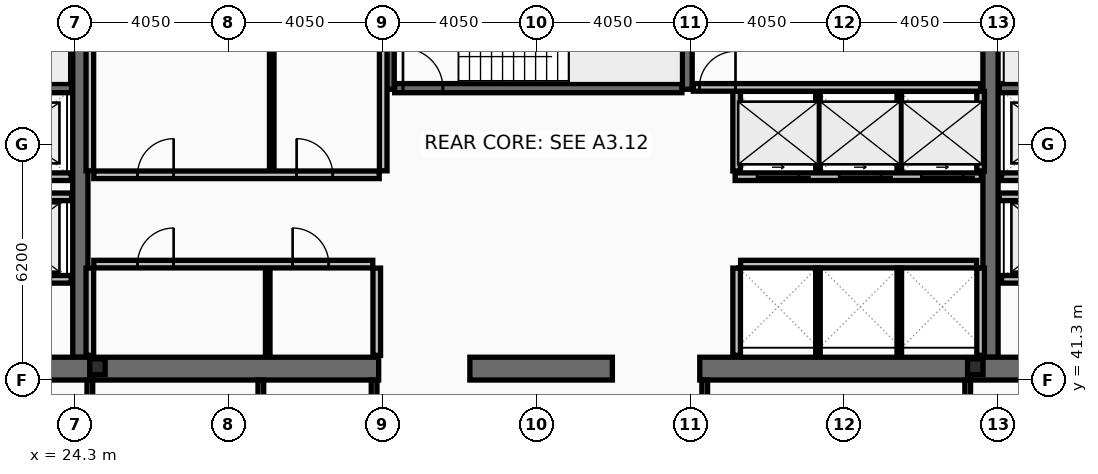
"""IFC4 building model, lengths in metres.
Left out: names, types, materials, properties, quantities, classifications, styles, units other than length and angle.
Written with IfcOpenShell. Run it as: python <this file> out.ifc"""

import sys

from ifc_helpers import new_model, si_unit, direction, frame, frame_2d, origin, origin_2d, place, context, subcontext, project, spatial, rectangle, i_section, extrude, element, fill, save


model = new_model("IFC4")
c1 = context("Model", 3, precision=1e-05, world=origin(), true_north=direction((0.0, 1.0)))
c2 = subcontext(c1, "Body", "Model", "MODEL_VIEW")
j1 = project(units=[si_unit("LENGTHUNIT", "METRE"), si_unit("PLANEANGLEUNIT", "RADIAN")], contexts=[c1])
p1 = place(None, origin())
s1 = spatial("IfcSite", under=j1, at=p1, CompositionType="ELEMENT")
p2 = place(p1, origin())
s2 = spatial("IfcBuilding", under=s1, at=p2, CompositionType="ELEMENT")
p3 = place(p2, frame((0.0, 0.0, 261.8)))
s3 = spatial("IfcBuildingStorey", under=s2, at=p3, CompositionType="ELEMENT", Elevation=261.8)
for number, where, z_axis, x_axis in (
    (1, (24.45, 41.9, 0.0), (0.0, 0.0, 1.0), (0.0, 1.0, 0.0)),
    (2, (48.4, 41.9, 0.0), (0.0, 0.0, 1.0), (0.0, 1.0, 0.0)),
):
    element("IfcWall", number, at=place(p3, frame(where, z_axis=z_axis, x_axis=x_axis)), inside=s3, PredefinedType="SHEAR", context=c2, shape_type="SweptSolid", body=[
        extrude(rectangle(XDim=11.2, YDim=0.4, at=frame_2d((5.6, 0.0))), origin(), (0.0, 0.0, 1.0), 3.4),
    ])
p4 = place(p3, frame((32.3, 41.6, 0.0), z_axis=(0.0, 0.0, 1.0), x_axis=(-1.0, 0.0, 0.0)))
e3 = element("IfcWall", 3, at=p4, inside=s3, PredefinedType="SHEAR", context=c2, shape_type="SweptSolid", body=[
    extrude(rectangle(XDim=11.45, YDim=0.6, at=frame_2d((5.725, 0.0))), origin(), (0.0, 0.0, 1.0), 3.4),
])
p5 = place(p3, frame((38.45, 41.6, 0.0), z_axis=(0.0, 0.0, 1.0), x_axis=(-1.0, 0.0, 0.0)))
e4 = element("IfcWall", 4, at=p5, inside=s3, PredefinedType="SHEAR", context=c2, shape_type="SweptSolid", body=[
    extrude(rectangle(XDim=3.75, YDim=0.6, at=frame_2d((1.875, 0.0))), origin(), (0.0, 0.0, 1.0), 3.4),
])
p6 = place(p3, frame((52.05, 41.6, 0.0), z_axis=(0.0, 0.0, 1.0), x_axis=(-1.0, 0.0, 0.0)))
e5 = element("IfcWall", 5, at=p6, inside=s3, PredefinedType="SHEAR", context=c2, shape_type="SweptSolid", body=[
    extrude(rectangle(XDim=11.3, YDim=0.6, at=frame_2d((5.65, 0.0))), origin(), (0.0, 0.0, 1.0), 3.4),
])
for number, where, z_axis, x_axis in (
    (6, (32.58, 48.95, 0.0), (0.0, 0.0, 1.0), (0.0, 1.0, 0.0)),
    (7, (40.42, 48.95, 0.0), (0.0, 0.0, 1.0), (0.0, 1.0, 0.0)),
):
    element("IfcWall", number, at=place(p3, frame(where, z_axis=z_axis, x_axis=x_axis)), inside=s3, PredefinedType="SHEAR", context=c2, shape_type="SweptSolid", body=[
        extrude(rectangle(XDim=4.15, YDim=0.26, at=frame_2d((2.075, 0.0))), origin(), (0.0, 0.0, 1.0), 3.4),
    ])
p7 = place(p3, frame((16.8, 48.98, 0.0), z_axis=(0.0, 0.0, 1.0), x_axis=(1.0, 0.0, 0.0)))
e8 = element("IfcWall", 8, at=p7, inside=s3, PredefinedType="SHEAR", context=c2, shape_type="SweptSolid", body=[
    extrude(rectangle(XDim=7.42, YDim=0.24, at=frame_2d((3.71, 0.0))), origin(), (0.0, 0.0, 1.0), 3.4),
])
p8 = place(p7, frame((0.22, 0.0, 0.0)))
e9 = element("IfcOpeningElement", 9, at=p8, cuts=e8, PredefinedType="OPENING", context=c2, shape_type="SweptSolid", body=[
    extrude(rectangle(XDim=1.05, YDim=2.15, at=frame_2d((0.525, 1.075))), frame((0.0, 0.13, 0.0), z_axis=(0.0, -1.0, 0.0), x_axis=(1.0, 0.0, 0.0)), (0.0, 0.0, 1.0), 0.26),
])
p9 = place(p3, frame((48.63, 48.98, 0.0), z_axis=(0.0, 0.0, 1.0), x_axis=(1.0, 0.0, 0.0)))
e10 = element("IfcWall", 10, at=p9, inside=s3, PredefinedType="SHEAR", context=c2, shape_type="SweptSolid", body=[
    extrude(rectangle(XDim=7.47, YDim=0.24, at=frame_2d((3.735, 0.0))), origin(), (0.0, 0.0, 1.0), 3.4),
])
p10 = place(p9, frame((6.2, 0.0, 0.0)))
e11 = element("IfcOpeningElement", 11, at=p10, cuts=e10, PredefinedType="OPENING", context=c2, shape_type="SweptSolid", body=[
    extrude(rectangle(XDim=1.05, YDim=2.15, at=frame_2d((0.525, 1.075))), frame((0.0, 0.13, 0.0), z_axis=(0.0, -1.0, 0.0), x_axis=(1.0, 0.0, 0.0)), (0.0, 0.0, 1.0), 0.26),
])
p11 = place(p3, frame((32.72, 48.98, 0.0), z_axis=(0.0, 0.0, 1.0), x_axis=(1.0, 0.0, 0.0)))
e12 = element("IfcWall", 12, at=p11, inside=s3, PredefinedType="SHEAR", context=c2, shape_type="SweptSolid", body=[
    extrude(rectangle(XDim=7.56, YDim=0.24, at=frame_2d((3.78, 0.0))), origin(), (0.0, 0.0, 1.0), 3.4),
])
p12 = place(p11, frame((0.22, 0.0, 0.0)))
e13 = element("IfcOpeningElement", 13, at=p12, cuts=e12, PredefinedType="OPENING", context=c2, shape_type="SweptSolid", body=[
    extrude(rectangle(XDim=1.05, YDim=2.15, at=frame_2d((0.525, 1.075))), frame((0.0, 0.13, 0.0), z_axis=(0.0, -1.0, 0.0), x_axis=(1.0, 0.0, 0.0)), (0.0, 0.0, 1.0), 0.26),
])
for number, where, z_axis, x_axis in (
    (14, (24.9, 41.65, 0.0), (0.0, 0.0, 1.0), (1.0, 0.0, 0.0)),
    (15, (48.0, 41.65, 0.0), (0.0, 0.0, 1.0), (1.0, 0.0, 0.0)),
):
    element("IfcColumn", number, at=place(p3, frame(where, z_axis=z_axis, x_axis=x_axis)), inside=s3, PredefinedType="COLUMN", context=c2, shape_type="SweptSolid", body=[
        extrude(i_section(OverallWidth=0.406, OverallDepth=0.416, WebThickness=0.03, FlangeThickness=0.048, at=origin_2d()), origin(), (0.0, 0.0, 1.0), 3.6),
    ])
p13 = place(p3, frame((51.61, 43.95, 0.0), z_axis=(0.0, 0.0, 1.0), x_axis=(-1.0, 0.0, 0.0)))
e16 = element("IfcWall", 16, at=p13, inside=s3, PredefinedType="PARTITIONING", context=c2, shape_type="SweptSolid", body=[
    extrude(rectangle(XDim=2.92, YDim=0.2, at=frame_2d((1.46, 0.0))), origin(), (0.0, 0.0, 1.0), 3.4),
])
p14 = place(p13, frame((0.81, 0.0, 0.0)))
e17 = element("IfcOpeningElement", 17, at=p14, cuts=e16, PredefinedType="OPENING", context=c2, shape_type="SweptSolid", body=[
    extrude(rectangle(XDim=1.3, YDim=2.18, at=frame_2d((0.65, 1.09))), frame((0.0, 0.11, 0.0), z_axis=(0.0, -1.0, 0.0), x_axis=(1.0, 0.0, 0.0)), (0.0, 0.0, 1.0), 0.22),
])
p15 = place(p3, frame((24.21, 43.95, 0.0), z_axis=(0.0, 0.0, 1.0), x_axis=(-1.0, 0.0, 0.0)))
e18 = element("IfcWall", 18, at=p15, inside=s3, PredefinedType="PARTITIONING", context=c2, shape_type="SweptSolid", body=[
    extrude(rectangle(XDim=2.97, YDim=0.2, at=frame_2d((1.485, 0.0))), origin(), (0.0, 0.0, 1.0), 3.4),
])
p16 = place(p15, frame((0.86, 0.0, 0.0)))
e19 = element("IfcOpeningElement", 19, at=p16, cuts=e18, PredefinedType="OPENING", context=c2, shape_type="SweptSolid", body=[
    extrude(rectangle(XDim=1.3, YDim=2.18, at=frame_2d((0.65, 1.09))), frame((0.0, 0.11, 0.0), z_axis=(0.0, -1.0, 0.0), x_axis=(1.0, 0.0, 0.0)), (0.0, 0.0, 1.0), 0.22),
])
p17 = place(p3, frame((51.61, 46.65, 0.0), z_axis=(0.0, 0.0, 1.0), x_axis=(-1.0, 0.0, 0.0)))
e20 = element("IfcWall", 20, at=p17, inside=s3, PredefinedType="PARTITIONING", context=c2, shape_type="SweptSolid", body=[
    extrude(rectangle(XDim=2.92, YDim=0.2, at=frame_2d((1.46, 0.0))), origin(), (0.0, 0.0, 1.0), 3.4),
])
p18 = place(p17, frame((0.86, 0.0, 0.0)))
e21 = element("IfcOpeningElement", 21, at=p18, cuts=e20, PredefinedType="OPENING", context=c2, shape_type="SweptSolid", body=[
    extrude(rectangle(XDim=1.2, YDim=2.18, at=frame_2d((0.6, 1.09))), frame((0.0, 0.11, 0.0), z_axis=(0.0, -1.0, 0.0), x_axis=(1.0, 0.0, 0.0)), (0.0, 0.0, 1.0), 0.22),
])
p19 = place(p3, frame((24.21, 46.65, 0.0), z_axis=(0.0, 0.0, 1.0), x_axis=(-1.0, 0.0, 0.0)))
e22 = element("IfcWall", 22, at=p19, inside=s3, PredefinedType="PARTITIONING", context=c2, shape_type="SweptSolid", body=[
    extrude(rectangle(XDim=2.97, YDim=0.2, at=frame_2d((1.485, 0.0))), origin(), (0.0, 0.0, 1.0), 3.4),
])
p20 = place(p19, frame((0.91, 0.0, 0.0)))
e23 = element("IfcOpeningElement", 23, at=p20, cuts=e22, PredefinedType="OPENING", context=c2, shape_type="SweptSolid", body=[
    extrude(rectangle(XDim=1.2, YDim=2.18, at=frame_2d((0.6, 1.09))), frame((0.0, 0.11, 0.0), z_axis=(0.0, -1.0, 0.0), x_axis=(1.0, 0.0, 0.0)), (0.0, 0.0, 1.0), 0.22),
])
p21 = place(p3, frame((48.16, 46.65, 0.0), z_axis=(0.0, 0.0, 1.0), x_axis=(-1.0, 0.0, 0.0)))
e24 = element("IfcWall", 24, at=p21, inside=s3, PredefinedType="PARTITIONING", context=c2, shape_type="SweptSolid", body=[
    extrude(rectangle(XDim=6.48, YDim=0.2, at=frame_2d((3.24, 0.0))), origin(), (0.0, 0.0, 1.0), 3.4),
])
p22 = place(p21, frame((4.8, 0.0, 0.0)))
e25 = element("IfcOpeningElement", 25, at=p22, cuts=e24, PredefinedType="OPENING", context=c2, shape_type="SweptSolid", body=[
    extrude(rectangle(XDim=1.1, YDim=2.18, at=frame_2d((0.55, 1.09))), frame((0.0, 0.11, 0.0), z_axis=(0.0, -1.0, 0.0), x_axis=(1.0, 0.0, 0.0)), (0.0, 0.0, 1.0), 0.22),
])
p23 = place(p21, frame((2.64, 0.0, 0.0)))
e26 = element("IfcOpeningElement", 26, at=p23, cuts=e24, PredefinedType="OPENING", context=c2, shape_type="SweptSolid", body=[
    extrude(rectangle(XDim=1.1, YDim=2.18, at=frame_2d((0.55, 1.09))), frame((0.0, 0.11, 0.0), z_axis=(0.0, -1.0, 0.0), x_axis=(1.0, 0.0, 0.0)), (0.0, 0.0, 1.0), 0.22),
])
p24 = place(p21, frame((0.48, 0.0, 0.0)))
e27 = element("IfcOpeningElement", 27, at=p24, cuts=e24, PredefinedType="OPENING", context=c2, shape_type="SweptSolid", body=[
    extrude(rectangle(XDim=1.1, YDim=2.18, at=frame_2d((0.55, 1.09))), frame((0.0, 0.11, 0.0), z_axis=(0.0, -1.0, 0.0), x_axis=(1.0, 0.0, 0.0)), (0.0, 0.0, 1.0), 0.22),
])
p25 = place(p3, frame((21.2, 46.12, 0.0), z_axis=(0.0, 0.0, 1.0), x_axis=(1.0, 0.0, 0.0)))
e28 = element("IfcWall", 28, at=p25, inside=s3, PredefinedType="PARTITIONING", context=c2, shape_type="SweptSolid", body=[
    extrude(rectangle(XDim=3.02, YDim=0.2, at=frame_2d((1.51, 0.0))), origin(), (0.0, 0.0, 1.0), 3.4),
])
p26 = place(p3, frame((48.63, 46.12, 0.0), z_axis=(0.0, 0.0, 1.0), x_axis=(1.0, 0.0, 0.0)))
e29 = element("IfcWall", 29, at=p26, inside=s3, PredefinedType="PARTITIONING", context=c2, shape_type="SweptSolid", body=[
    extrude(rectangle(XDim=3.07, YDim=0.2, at=frame_2d((1.535, 0.0))), origin(), (0.0, 0.0, 1.0), 3.4),
])
for number, where, z_axis, x_axis in (
    (30, (24.7, 46.805, 0.0), (0.0, 0.0, 1.0), (0.0, 1.0, 0.0)),
    (31, (32.42, 46.805, 0.0), (0.0, 0.0, 1.0), (0.0, 1.0, 0.0)),
):
    element("IfcWall", number, at=place(p3, frame(where, z_axis=z_axis, x_axis=x_axis)), inside=s3, PredefinedType="PARTITIONING", context=c2, shape_type="SweptSolid", body=[
        extrude(rectangle(XDim=5.99, YDim=0.2, at=frame_2d((2.995, 0.0))), origin(), (0.0, 0.0, 1.0), 3.4),
    ])
p27 = place(p3, frame((29.486, 46.805, 0.0), z_axis=(0.0, 0.0, 1.0), x_axis=(0.0, 1.0, 0.0)))
e32 = element("IfcWall", 32, at=p27, inside=s3, PredefinedType="PARTITIONING", context=c2, shape_type="SweptSolid", body=[
    extrude(rectangle(XDim=5.99, YDim=0.12, at=frame_2d((2.995, 0.0))), origin(), (0.0, 0.0, 1.0), 3.4),
])
p28 = place(p3, frame((24.805, 46.7, 0.0), z_axis=(0.0, 0.0, 1.0), x_axis=(1.0, 0.0, 0.0)))
e33 = element("IfcWall", 33, at=p28, inside=s3, PredefinedType="PARTITIONING", context=c2, shape_type="SweptSolid", body=[
    extrude(rectangle(XDim=7.51, YDim=0.2, at=frame_2d((3.755, 0.0))), origin(), (0.0, 0.0, 1.0), 3.4),
])
p29 = place(p28, frame((1.15, 0.0, 0.0)))
e34 = element("IfcOpeningElement", 34, at=p29, cuts=e33, PredefinedType="OPENING", context=c2, shape_type="SweptSolid", body=[
    extrude(rectangle(XDim=0.95, YDim=2.1, at=frame_2d((0.475, 1.05))), frame((0.0, 0.11, 0.0), z_axis=(0.0, -1.0, 0.0), x_axis=(1.0, 0.0, 0.0)), (0.0, 0.0, 1.0), 0.22),
])
p30 = place(p28, frame((5.336, 0.0, 0.0)))
e35 = element("IfcOpeningElement", 35, at=p30, cuts=e33, PredefinedType="OPENING", context=c2, shape_type="SweptSolid", body=[
    extrude(rectangle(XDim=0.95, YDim=2.1, at=frame_2d((0.475, 1.05))), frame((0.0, 0.11, 0.0), z_axis=(0.0, -1.0, 0.0), x_axis=(1.0, 0.0, 0.0)), (0.0, 0.0, 1.0), 0.22),
])
for number, where, z_axis, x_axis in (
    (36, (24.7, 41.95, 0.0), (0.0, 0.0, 1.0), (0.0, 1.0, 0.0)),
    (37, (32.25, 41.95, 0.0), (0.0, 0.0, 1.0), (0.0, 1.0, 0.0)),
):
    element("IfcWall", number, at=place(p3, frame(where, z_axis=z_axis, x_axis=x_axis)), inside=s3, PredefinedType="PARTITIONING", context=c2, shape_type="SweptSolid", body=[
        extrude(rectangle(XDim=2.295, YDim=0.2, at=frame_2d((1.147, 0.0))), origin(), (0.0, 0.0, 1.0), 3.4),
    ])
p31 = place(p3, frame((29.381, 41.95, 0.0), z_axis=(0.0, 0.0, 1.0), x_axis=(0.0, 1.0, 0.0)))
e38 = element("IfcWall", 38, at=p31, inside=s3, PredefinedType="PARTITIONING", context=c2, shape_type="SweptSolid", body=[
    extrude(rectangle(XDim=2.295, YDim=0.12, at=frame_2d((1.147, 0.0))), origin(), (0.0, 0.0, 1.0), 3.4),
])
p32 = place(p3, frame((24.805, 44.35, 0.0), z_axis=(0.0, 0.0, 1.0), x_axis=(1.0, 0.0, 0.0)))
e39 = element("IfcWall", 39, at=p32, inside=s3, PredefinedType="PARTITIONING", context=c2, shape_type="SweptSolid", body=[
    extrude(rectangle(XDim=7.34, YDim=0.2, at=frame_2d((3.67, 0.0))), origin(), (0.0, 0.0, 1.0), 3.4),
])
p33 = place(p32, frame((1.15, 0.0, 0.0)))
e40 = element("IfcOpeningElement", 40, at=p33, cuts=e39, PredefinedType="OPENING", context=c2, shape_type="SweptSolid", body=[
    extrude(rectangle(XDim=0.95, YDim=2.1, at=frame_2d((0.475, 1.05))), frame((0.0, 0.11, 0.0), z_axis=(0.0, -1.0, 0.0), x_axis=(1.0, 0.0, 0.0)), (0.0, 0.0, 1.0), 0.22),
])
p34 = place(p32, frame((5.231, 0.0, 0.0)))
e41 = element("IfcOpeningElement", 41, at=p34, cuts=e39, PredefinedType="OPENING", context=c2, shape_type="SweptSolid", body=[
    extrude(rectangle(XDim=0.95, YDim=2.1, at=frame_2d((0.475, 1.05))), frame((0.0, 0.11, 0.0), z_axis=(0.0, -1.0, 0.0), x_axis=(1.0, 0.0, 0.0)), (0.0, 0.0, 1.0), 0.22),
])
for number, where, z_axis, x_axis in (
    (42, (41.72, 46.8, 0.0), (0.0, 0.0, 1.0), (0.0, 1.0, 0.0)),
    (43, (48.14, 46.8, 0.0), (0.0, 0.0, 1.0), (0.0, 1.0, 0.0)),
):
    element("IfcWall", number, at=place(p3, frame(where, z_axis=z_axis, x_axis=x_axis)), inside=s3, PredefinedType="PARTITIONING", context=c2, shape_type="SweptSolid", body=[
        extrude(rectangle(XDim=2.095, YDim=0.2, at=frame_2d((1.047, 0.0))), origin(), (0.0, 0.0, 1.0), 3.4),
    ])
for number, where, z_axis, x_axis in (
    (44, (43.86, 46.8, 0.0), (0.0, 0.0, 1.0), (0.0, 1.0, 0.0)),
    (45, (46.0, 46.8, 0.0), (0.0, 0.0, 1.0), (0.0, 1.0, 0.0)),
):
    element("IfcWall", number, at=place(p3, frame(where, z_axis=z_axis, x_axis=x_axis)), inside=s3, PredefinedType="PARTITIONING", context=c2, shape_type="SweptSolid", body=[
        extrude(rectangle(XDim=2.095, YDim=0.12, at=frame_2d((1.047, 0.0))), origin(), (0.0, 0.0, 1.0), 3.4),
    ])
p35 = place(p3, frame((41.825, 44.35, 0.0), z_axis=(0.0, 0.0, 1.0), x_axis=(1.0, 0.0, 0.0)))
e46 = element("IfcWall", 46, at=p35, inside=s3, PredefinedType="PARTITIONING", context=c2, shape_type="SweptSolid", body=[
    extrude(rectangle(XDim=6.21, YDim=0.2, at=frame_2d((3.105, 0.0))), origin(), (0.0, 0.0, 1.0), 3.4),
])
for number, where, z_axis, x_axis in (
    (47, (41.72, 41.95, 0.0), (0.0, 0.0, 1.0), (0.0, 1.0, 0.0)),
    (48, (48.14, 41.95, 0.0), (0.0, 0.0, 1.0), (0.0, 1.0, 0.0)),
):
    element("IfcWall", number, at=place(p3, frame(where, z_axis=z_axis, x_axis=x_axis)), inside=s3, PredefinedType="PARTITIONING", context=c2, shape_type="SweptSolid", body=[
        extrude(rectangle(XDim=2.295, YDim=0.2, at=frame_2d((1.147, 0.0))), origin(), (0.0, 0.0, 1.0), 3.4),
    ])
for number, where, z_axis, x_axis in (
    (49, (43.86, 41.95, 0.0), (0.0, 0.0, 1.0), (0.0, 1.0, 0.0)),
    (50, (46.0, 41.95, 0.0), (0.0, 0.0, 1.0), (0.0, 1.0, 0.0)),
):
    element("IfcWall", number, at=place(p3, frame(where, z_axis=z_axis, x_axis=x_axis)), inside=s3, PredefinedType="PARTITIONING", context=c2, shape_type="SweptSolid", body=[
        extrude(rectangle(XDim=2.295, YDim=0.12, at=frame_2d((1.147, 0.0))), origin(), (0.0, 0.0, 1.0), 3.4),
    ])
p36 = place(p3, frame((40.58, 49.0, 0.0), z_axis=(0.0, 0.0, 1.0), x_axis=(1.0, 0.0, 0.0)))
e51 = element("IfcWall", 51, at=p36, inside=s3, PredefinedType="PARTITIONING", context=c2, shape_type="SweptSolid", body=[
    extrude(rectangle(XDim=7.56, YDim=0.2, at=frame_2d((3.78, 0.0))), origin(), (0.0, 0.0, 1.0), 3.4),
])
p37 = place(p36, frame((0.16, 0.0, 0.0)))
e52 = element("IfcOpeningElement", 52, at=p37, cuts=e51, PredefinedType="OPENING", context=c2, shape_type="SweptSolid", body=[
    extrude(rectangle(XDim=0.95, YDim=2.1, at=frame_2d((0.475, 1.05))), frame((0.0, 0.11, 0.0), z_axis=(0.0, -1.0, 0.0), x_axis=(1.0, 0.0, 0.0)), (0.0, 0.0, 1.0), 0.22),
])
p38 = place(p3, frame((24.7, 38.28, 0.0), z_axis=(0.0, 0.0, 1.0), x_axis=(0.0, 1.0, 0.0)))
e53 = element("IfcWall", 53, at=p38, inside=s3, PredefinedType="PARTITIONING", context=c2, shape_type="SweptSolid", body=[
    extrude(rectangle(XDim=3.02, YDim=0.15, at=frame_2d((1.51, 0.0))), origin(), (0.0, 0.0, 1.0), 2.74),
])
for number, where, z_axis, x_axis in (
    (54, (29.2, 38.28, 0.0), (0.0, 0.0, 1.0), (0.0, 1.0, 0.0)),
    (55, (32.18, 38.28, 0.0), (0.0, 0.0, 1.0), (0.0, 1.0, 0.0)),
    (56, (40.88, 38.28, 0.0), (0.0, 0.0, 1.0), (0.0, 1.0, 0.0)),
):
    element("IfcWall", number, at=place(p3, frame(where, z_axis=z_axis, x_axis=x_axis)), inside=s3, PredefinedType="PARTITIONING", context=c2, shape_type="SweptSolid", body=[
        extrude(rectangle(XDim=3.02, YDim=0.15, at=frame_2d((1.51, 0.0))), origin(), (0.0, 0.0, 1.0), 3.4),
    ])
p39 = place(p3, frame((47.8, 38.28, 0.0), z_axis=(0.0, 0.0, 1.0), x_axis=(0.0, 1.0, 0.0)))
e57 = element("IfcWall", 57, at=p39, inside=s3, PredefinedType="PARTITIONING", context=c2, shape_type="SweptSolid", body=[
    extrude(rectangle(XDim=3.02, YDim=0.15, at=frame_2d((1.51, 0.0))), origin(), (0.0, 0.0, 1.0), 2.74),
])
p40 = place(p12, origin())
e58 = element("IfcDoor", 58, at=p40, inside=s3, OperationType="SINGLE_SWING_LEFT", PredefinedType="DOOR", context=c2, shape_type="SweptSolid", body=[
    extrude(rectangle(XDim=1.05, YDim=2.15, at=frame_2d((0.525, 1.075))), frame((0.0, 0.025, 0.0), z_axis=(0.0, -1.0, 0.0), x_axis=(1.0, 0.0, 0.0)), (0.0, 0.0, 1.0), 0.05),
])
fill(e13, e58)
p41 = place(p22, origin())
e59 = element("IfcDoor", 59, at=p41, inside=s3, OperationType="SLIDING_TO_LEFT", PredefinedType="DOOR", context=c2, shape_type="SweptSolid", body=[
    extrude(rectangle(XDim=1.1, YDim=2.18, at=frame_2d((0.55, 1.09))), frame((0.0, 0.025, 0.0), z_axis=(0.0, -1.0, 0.0), x_axis=(1.0, 0.0, 0.0)), (0.0, 0.0, 1.0), 0.05),
])
fill(e25, e59)
p42 = place(p23, origin())
e60 = element("IfcDoor", 60, at=p42, inside=s3, OperationType="SLIDING_TO_LEFT", PredefinedType="DOOR", context=c2, shape_type="SweptSolid", body=[
    extrude(rectangle(XDim=1.1, YDim=2.18, at=frame_2d((0.55, 1.09))), frame((0.0, 0.025, 0.0), z_axis=(0.0, -1.0, 0.0), x_axis=(1.0, 0.0, 0.0)), (0.0, 0.0, 1.0), 0.05),
])
fill(e26, e60)
p43 = place(p24, origin())
e61 = element("IfcDoor", 61, at=p43, inside=s3, OperationType="SLIDING_TO_LEFT", PredefinedType="DOOR", context=c2, shape_type="SweptSolid", body=[
    extrude(rectangle(XDim=1.1, YDim=2.18, at=frame_2d((0.55, 1.09))), frame((0.0, 0.025, 0.0), z_axis=(0.0, -1.0, 0.0), x_axis=(1.0, 0.0, 0.0)), (0.0, 0.0, 1.0), 0.05),
])
fill(e27, e61)
p44 = place(p29, origin())
e62 = element("IfcDoor", 62, at=p44, inside=s3, OperationType="SINGLE_SWING_RIGHT", PredefinedType="DOOR", context=c2, shape_type="SweptSolid", body=[
    extrude(rectangle(XDim=0.95, YDim=2.1, at=frame_2d((0.475, 1.05))), frame((0.0, 0.025, 0.0), z_axis=(0.0, -1.0, 0.0), x_axis=(1.0, 0.0, 0.0)), (0.0, 0.0, 1.0), 0.05),
])
fill(e34, e62)
p45 = place(p30, origin())
e63 = element("IfcDoor", 63, at=p45, inside=s3, OperationType="SINGLE_SWING_LEFT", PredefinedType="DOOR", context=c2, shape_type="SweptSolid", body=[
    extrude(rectangle(XDim=0.95, YDim=2.1, at=frame_2d((0.475, 1.05))), frame((0.0, 0.025, 0.0), z_axis=(0.0, -1.0, 0.0), x_axis=(1.0, 0.0, 0.0)), (0.0, 0.0, 1.0), 0.05),
])
fill(e35, e63)
p46 = place(p33, origin())
e64 = element("IfcDoor", 64, at=p46, inside=s3, OperationType="SINGLE_SWING_RIGHT", PredefinedType="DOOR", context=c2, shape_type="SweptSolid", body=[
    extrude(rectangle(XDim=0.95, YDim=2.1, at=frame_2d((0.475, 1.05))), frame((0.0, 0.025, 0.0), z_axis=(0.0, -1.0, 0.0), x_axis=(1.0, 0.0, 0.0)), (0.0, 0.0, 1.0), 0.05),
])
fill(e40, e64)
p47 = place(p34, origin())
e65 = element("IfcDoor", 65, at=p47, inside=s3, OperationType="SINGLE_SWING_LEFT", PredefinedType="DOOR", context=c2, shape_type="SweptSolid", body=[
    extrude(rectangle(XDim=0.95, YDim=2.1, at=frame_2d((0.475, 1.05))), frame((0.0, 0.025, 0.0), z_axis=(0.0, -1.0, 0.0), x_axis=(1.0, 0.0, 0.0)), (0.0, 0.0, 1.0), 0.05),
])
fill(e41, e65)
p48 = place(p37, origin())
e66 = element("IfcDoor", 66, at=p48, inside=s3, OperationType="SINGLE_SWING_RIGHT", PredefinedType="DOOR", context=c2, shape_type="SweptSolid", body=[
    extrude(rectangle(XDim=0.95, YDim=2.1, at=frame_2d((0.475, 1.05))), frame((0.0, 0.025, 0.0), z_axis=(0.0, -1.0, 0.0), x_axis=(1.0, 0.0, 0.0)), (0.0, 0.0, 1.0), 0.05),
])
fill(e52, e66)
save(model, sys.argv[1])
